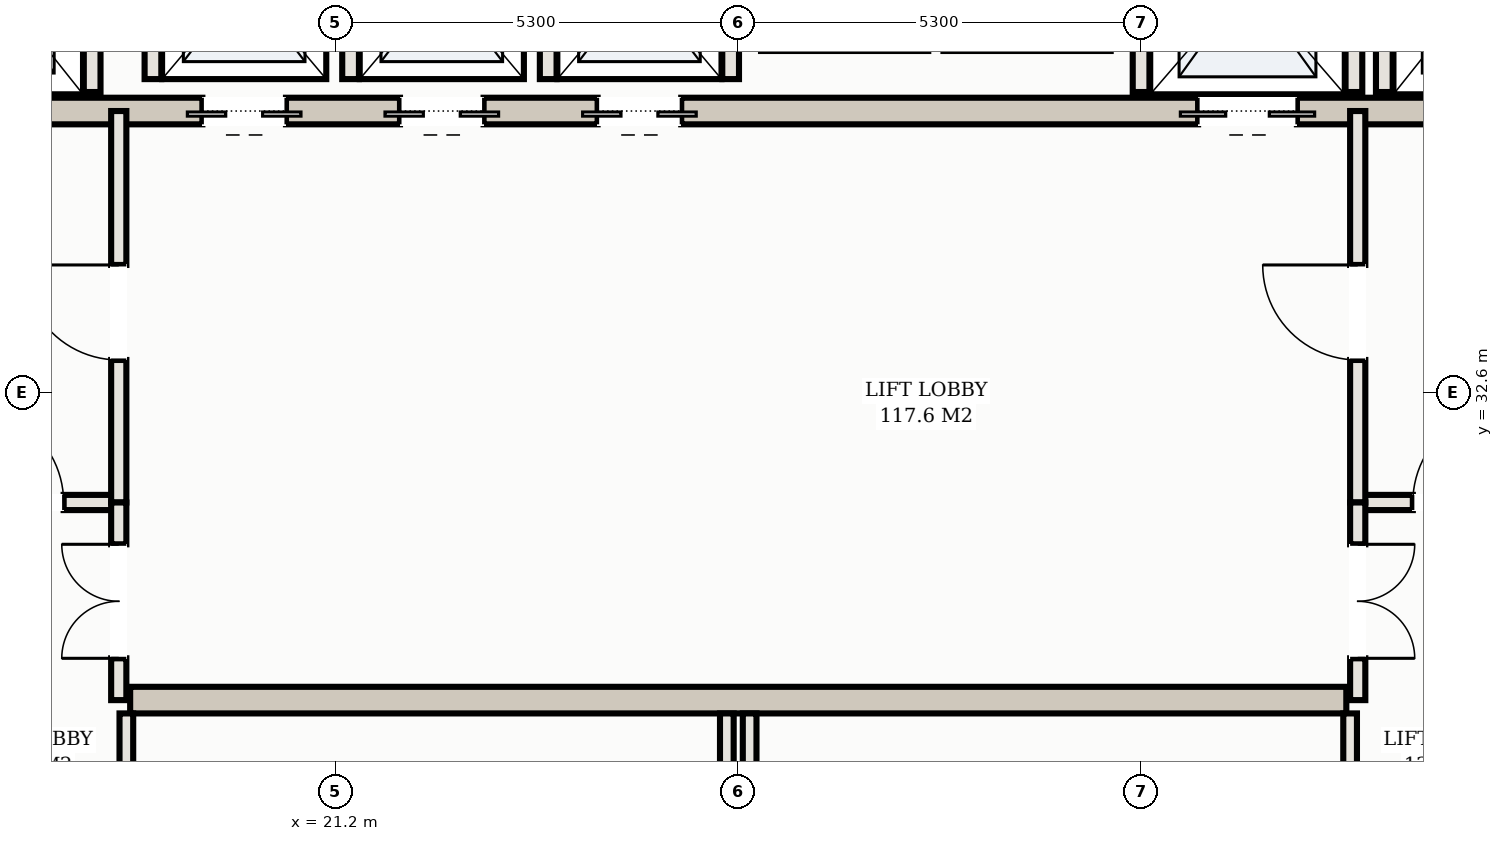
"""IFC4 building model, lengths in metres.
Left out: names, types, materials, properties, quantities, classifications, styles, units other than length and angle.
Written with IfcOpenShell. Run it as: python <this file> out.ifc"""

import sys

from ifc_helpers import new_model, si_unit, direction, frame, frame_2d, origin, place, context, subcontext, project, spatial, rectangle, extrude, element, fill, save


model = new_model("IFC4")
c1 = context("Model", 3, precision=1e-05, world=origin(), true_north=direction((0.0, 1.0)))
c2 = subcontext(c1, "Body", "Model", "MODEL_VIEW")
j1 = project(units=[si_unit("LENGTHUNIT", "METRE"), si_unit("PLANEANGLEUNIT", "RADIAN")], contexts=[c1])
p1 = place(None, origin())
s1 = spatial("IfcSite", under=j1, at=p1, CompositionType="ELEMENT")
p2 = place(p1, origin())
s2 = spatial("IfcBuilding", under=s1, at=p2, CompositionType="ELEMENT")
p3 = place(p2, frame((0.0, 0.0, 200.0)))
s3 = spatial("IfcBuildingStorey", under=s2, at=p3, CompositionType="ELEMENT", Elevation=200.0)
p4 = place(p3, frame((15.5, 36.3, 0.0), z_axis=(0.0, 0.0, 1.0), x_axis=(1.0, 0.0, 0.0)))
e1 = element("IfcWall", 1, at=p4, inside=s3, PredefinedType="SHEAR", context=c2, shape_type="SweptSolid", body=[
    extrude(rectangle(XDim=22.0, YDim=0.35, at=frame_2d((11.0, 0.0))), origin(), (0.0, 0.0, 1.0), 3.11),
])
p5 = place(p4, frame((0.65, 0.0, 0.0)))
e2 = element("IfcOpeningElement", 2, at=p5, cuts=e1, PredefinedType="OPENING", context=c2, shape_type="SweptSolid", body=[
    extrude(rectangle(XDim=1.1, YDim=2.15, at=frame_2d((0.55, 1.075))), frame((0.0, 0.185, 0.0), z_axis=(0.0, -1.0, 0.0), x_axis=(1.0, 0.0, 0.0)), (0.0, 0.0, 1.0), 0.37),
])
p6 = place(p4, frame((20.25, 0.0, 0.0)))
e3 = element("IfcOpeningElement", 3, at=p6, cuts=e1, PredefinedType="OPENING", context=c2, shape_type="SweptSolid", body=[
    extrude(rectangle(XDim=1.1, YDim=2.15, at=frame_2d((0.55, 1.075))), frame((0.0, 0.185, 0.0), z_axis=(0.0, -1.0, 0.0), x_axis=(1.0, 0.0, 0.0)), (0.0, 0.0, 1.0), 0.37),
])
p7 = place(p4, frame((17.05, 0.0, 0.0)))
e4 = element("IfcOpeningElement", 4, at=p7, cuts=e1, PredefinedType="OPENING", context=c2, shape_type="SweptSolid", body=[
    extrude(rectangle(XDim=1.3, YDim=2.2, at=frame_2d((0.65, 1.1))), frame((0.0, 0.185, 0.0), z_axis=(0.0, -1.0, 0.0), x_axis=(1.0, 0.0, 0.0)), (0.0, 0.0, 1.0), 0.37),
])
p8 = place(p4, frame((3.95, 0.0, 0.0)))
e5 = element("IfcOpeningElement", 5, at=p8, cuts=e1, PredefinedType="OPENING", context=c2, shape_type="SweptSolid", body=[
    extrude(rectangle(XDim=1.1, YDim=2.15, at=frame_2d((0.55, 1.075))), frame((0.0, 0.185, 0.0), z_axis=(0.0, -1.0, 0.0), x_axis=(1.0, 0.0, 0.0)), (0.0, 0.0, 1.0), 0.37),
])
p9 = place(p4, frame((6.55, 0.0, 0.0)))
e6 = element("IfcOpeningElement", 6, at=p9, cuts=e1, PredefinedType="OPENING", context=c2, shape_type="SweptSolid", body=[
    extrude(rectangle(XDim=1.1, YDim=2.15, at=frame_2d((0.55, 1.075))), frame((0.0, 0.185, 0.0), z_axis=(0.0, -1.0, 0.0), x_axis=(1.0, 0.0, 0.0)), (0.0, 0.0, 1.0), 0.37),
])
p10 = place(p4, frame((9.15, 0.0, 0.0)))
e7 = element("IfcOpeningElement", 7, at=p10, cuts=e1, PredefinedType="OPENING", context=c2, shape_type="SweptSolid", body=[
    extrude(rectangle(XDim=1.1, YDim=2.15, at=frame_2d((0.55, 1.075))), frame((0.0, 0.185, 0.0), z_axis=(0.0, -1.0, 0.0), x_axis=(1.0, 0.0, 0.0)), (0.0, 0.0, 1.0), 0.37),
])
p11 = place(p3, frame((18.5, 28.55, 0.0), z_axis=(0.0, 0.0, 1.0), x_axis=(1.0, 0.0, 0.0)))
e8 = element("IfcWall", 8, at=p11, inside=s3, PredefinedType="SHEAR", context=c2, shape_type="SweptSolid", body=[
    extrude(rectangle(XDim=16.0, YDim=0.35, at=frame_2d((8.0, 0.0))), origin(), (0.0, 0.0, 1.0), 3.11),
])
for number, where, z_axis, x_axis in (
    (9, (18.0, 36.55, 0.0), (0.0, 0.0, 1.0), (0.0, 1.0, 0.0)),
    (10, (35.0, 36.55, 0.0), (0.0, 0.0, 1.0), (0.0, 1.0, 0.0)),
    (11, (31.8, 36.55, 0.0), (0.0, 0.0, 1.0), (0.0, 1.0, 0.0)),
    (12, (34.6, 36.55, 0.0), (0.0, 0.0, 1.0), (0.0, 1.0, 0.0)),
):
    element("IfcWall", number, at=place(p3, frame(where, z_axis=z_axis, x_axis=x_axis)), inside=s3, PredefinedType="SOLIDWALL", context=c2, shape_type="SweptSolid", body=[
        extrude(rectangle(XDim=2.93, YDim=0.22, at=frame_2d((1.465, 0.0))), origin(), (0.0, 0.0, 1.0), 3.11),
    ])
for number, where, z_axis, x_axis in (
    (13, (18.8, 36.72, 0.0), (0.0, 0.0, 1.0), (0.0, 1.0, 0.0)),
    (14, (21.4, 36.72, 0.0), (0.0, 0.0, 1.0), (0.0, 1.0, 0.0)),
    (15, (24.0, 36.72, 0.0), (0.0, 0.0, 1.0), (0.0, 1.0, 0.0)),
    (16, (26.4, 36.72, 0.0), (0.0, 0.0, 1.0), (0.0, 1.0, 0.0)),
):
    element("IfcWall", number, at=place(p3, frame(where, z_axis=z_axis, x_axis=x_axis)), inside=s3, PredefinedType="SOLIDWALL", context=c2, shape_type="SweptSolid", body=[
        extrude(rectangle(XDim=2.56, YDim=0.22, at=frame_2d((1.28, 0.0))), origin(), (0.0, 0.0, 1.0), 3.11),
    ])
p12 = place(p3, frame((15.1, 31.15, 0.0), z_axis=(0.0, 0.0, 1.0), x_axis=(1.0, 0.0, 0.0)))
e17 = element("IfcWall", 17, at=p12, inside=s3, PredefinedType="PARTITIONING", context=c2, shape_type="SweptSolid", body=[
    extrude(rectangle(XDim=3.25, YDim=0.2, at=frame_2d((1.625, 0.0))), origin(), (0.0, 0.0, 1.0), 2.43),
])
p13 = place(p12, frame((1.275, 0.0, 0.0)))
e18 = element("IfcOpeningElement", 18, at=p13, cuts=e17, PredefinedType="OPENING", context=c2, shape_type="SweptSolid", body=[
    extrude(rectangle(XDim=1.25, YDim=2.2, at=frame_2d((0.625, 1.1))), frame((0.0, 0.11, 0.0), z_axis=(0.0, -1.0, 0.0), x_axis=(1.0, 0.0, 0.0)), (0.0, 0.0, 1.0), 0.22),
])
p14 = place(p3, frame((18.35, 31.15, 0.0), z_axis=(0.0, 0.0, 1.0), x_axis=(0.0, 1.0, 0.0)))
e19 = element("IfcWall", 19, at=p14, inside=s3, PredefinedType="PARTITIONING", context=c2, shape_type="SweptSolid", body=[
    extrude(rectangle(XDim=5.15, YDim=0.2, at=frame_2d((2.575, 0.0))), origin(), (0.0, 0.0, 1.0), 2.43),
])
p15 = place(p14, frame((1.875, 0.0, 0.0)))
e20 = element("IfcOpeningElement", 20, at=p15, cuts=e19, PredefinedType="OPENING", context=c2, shape_type="SweptSolid", body=[
    extrude(rectangle(XDim=1.25, YDim=2.2, at=frame_2d((0.625, 1.1))), frame((0.0, 0.11, 0.0), z_axis=(0.0, -1.0, 0.0), x_axis=(1.0, 0.0, 0.0)), (0.0, 0.0, 1.0), 0.22),
])
p16 = place(p3, frame((34.65, 31.15, 0.0), z_axis=(0.0, 0.0, 1.0), x_axis=(1.0, 0.0, 0.0)))
e21 = element("IfcWall", 21, at=p16, inside=s3, PredefinedType="PARTITIONING", context=c2, shape_type="SweptSolid", body=[
    extrude(rectangle(XDim=3.25, YDim=0.2, at=frame_2d((1.625, 0.0))), origin(), (0.0, 0.0, 1.0), 2.43),
])
p17 = place(p16, frame((0.725, 0.0, 0.0)))
e22 = element("IfcOpeningElement", 22, at=p17, cuts=e21, PredefinedType="OPENING", context=c2, shape_type="SweptSolid", body=[
    extrude(rectangle(XDim=1.25, YDim=2.2, at=frame_2d((0.625, 1.1))), frame((0.0, 0.11, 0.0), z_axis=(0.0, -1.0, 0.0), x_axis=(1.0, 0.0, 0.0)), (0.0, 0.0, 1.0), 0.22),
])
p18 = place(p3, frame((34.65, 31.15, 0.0), z_axis=(0.0, 0.0, 1.0), x_axis=(0.0, 1.0, 0.0)))
e23 = element("IfcWall", 23, at=p18, inside=s3, PredefinedType="PARTITIONING", context=c2, shape_type="SweptSolid", body=[
    extrude(rectangle(XDim=5.15, YDim=0.2, at=frame_2d((2.575, 0.0))), origin(), (0.0, 0.0, 1.0), 2.43),
])
p19 = place(p18, frame((1.875, 0.0, 0.0)))
e24 = element("IfcOpeningElement", 24, at=p19, cuts=e23, PredefinedType="OPENING", context=c2, shape_type="SweptSolid", body=[
    extrude(rectangle(XDim=1.25, YDim=2.2, at=frame_2d((0.625, 1.1))), frame((0.0, 0.11, 0.0), z_axis=(0.0, -1.0, 0.0), x_axis=(1.0, 0.0, 0.0)), (0.0, 0.0, 1.0), 0.22),
])
p20 = place(p3, frame((18.35, 28.55, 0.0), z_axis=(0.0, 0.0, 1.0), x_axis=(0.0, 1.0, 0.0)))
e25 = element("IfcWall", 25, at=p20, inside=s3, PredefinedType="PARTITIONING", context=c2, shape_type="SweptSolid", body=[
    extrude(rectangle(XDim=2.6, YDim=0.2, at=frame_2d((1.3, 0.0))), origin(), (0.0, 0.0, 1.0), 2.43),
])
p21 = place(p20, frame((0.55, 0.0, 0.0)))
e26 = element("IfcOpeningElement", 26, at=p21, cuts=e25, PredefinedType="OPENING", context=c2, shape_type="SweptSolid", body=[
    extrude(rectangle(XDim=1.5, YDim=2.25, at=frame_2d((0.75, 1.125))), frame((0.0, 0.11, 0.0), z_axis=(0.0, -1.0, 0.0), x_axis=(1.0, 0.0, 0.0)), (0.0, 0.0, 1.0), 0.22),
])
p22 = place(p3, frame((34.65, 28.55, 0.0), z_axis=(0.0, 0.0, 1.0), x_axis=(0.0, 1.0, 0.0)))
e27 = element("IfcWall", 27, at=p22, inside=s3, PredefinedType="PARTITIONING", context=c2, shape_type="SweptSolid", body=[
    extrude(rectangle(XDim=2.6, YDim=0.2, at=frame_2d((1.3, 0.0))), origin(), (0.0, 0.0, 1.0), 2.43),
])
p23 = place(p22, frame((0.55, 0.0, 0.0)))
e28 = element("IfcOpeningElement", 28, at=p23, cuts=e27, PredefinedType="OPENING", context=c2, shape_type="SweptSolid", body=[
    extrude(rectangle(XDim=1.5, YDim=2.25, at=frame_2d((0.75, 1.125))), frame((0.0, 0.11, 0.0), z_axis=(0.0, -1.0, 0.0), x_axis=(1.0, 0.0, 0.0)), (0.0, 0.0, 1.0), 0.22),
])
for number, where, z_axis, x_axis in (
    (29, (18.45, 25.62, 0.0), (0.0, 0.0, 1.0), (0.0, 1.0, 0.0)),
    (30, (26.35, 25.62, 0.0), (0.0, 0.0, 1.0), (0.0, 1.0, 0.0)),
    (31, (26.65, 25.62, 0.0), (0.0, 0.0, 1.0), (0.0, 1.0, 0.0)),
    (32, (34.55, 25.62, 0.0), (0.0, 0.0, 1.0), (0.0, 1.0, 0.0)),
):
    element("IfcWall", number, at=place(p3, frame(where, z_axis=z_axis, x_axis=x_axis)), inside=s3, PredefinedType="PARTITIONING", context=c2, shape_type="SweptSolid", body=[
        extrude(rectangle(XDim=2.755, YDim=0.18, at=frame_2d((1.377, 0.0))), origin(), (0.0, 0.0, 1.0), 2.43),
    ])
p24 = place(p7, frame((1.3, 0.0, 0.0), z_axis=(0.0, 0.0, 1.0), x_axis=(-1.0, 0.0, 0.0)))
e33 = element("IfcDoor", 33, at=p24, inside=s3, OperationType="DOUBLE_DOOR_SLIDING", PredefinedType="DOOR", context=c2, shape_type="SweptSolid", body=[
    extrude(rectangle(XDim=1.3, YDim=2.2, at=frame_2d((0.65, 1.1))), frame((0.0, 0.025, 0.0), z_axis=(0.0, -1.0, 0.0), x_axis=(1.0, 0.0, 0.0)), (0.0, 0.0, 1.0), 0.05),
])
fill(e4, e33)
p25 = place(p8, frame((1.1, 0.0, 0.0), z_axis=(0.0, 0.0, 1.0), x_axis=(-1.0, 0.0, 0.0)))
e34 = element("IfcDoor", 34, at=p25, inside=s3, OperationType="DOUBLE_DOOR_SLIDING", PredefinedType="DOOR", context=c2, shape_type="SweptSolid", body=[
    extrude(rectangle(XDim=1.1, YDim=2.15, at=frame_2d((0.55, 1.075))), frame((0.0, 0.025, 0.0), z_axis=(0.0, -1.0, 0.0), x_axis=(1.0, 0.0, 0.0)), (0.0, 0.0, 1.0), 0.05),
])
fill(e5, e34)
p26 = place(p9, frame((1.1, 0.0, 0.0), z_axis=(0.0, 0.0, 1.0), x_axis=(-1.0, 0.0, 0.0)))
e35 = element("IfcDoor", 35, at=p26, inside=s3, OperationType="DOUBLE_DOOR_SLIDING", PredefinedType="DOOR", context=c2, shape_type="SweptSolid", body=[
    extrude(rectangle(XDim=1.1, YDim=2.15, at=frame_2d((0.55, 1.075))), frame((0.0, 0.025, 0.0), z_axis=(0.0, -1.0, 0.0), x_axis=(1.0, 0.0, 0.0)), (0.0, 0.0, 1.0), 0.05),
])
fill(e6, e35)
p27 = place(p10, frame((1.1, 0.0, 0.0), z_axis=(0.0, 0.0, 1.0), x_axis=(-1.0, 0.0, 0.0)))
e36 = element("IfcDoor", 36, at=p27, inside=s3, OperationType="DOUBLE_DOOR_SLIDING", PredefinedType="DOOR", context=c2, shape_type="SweptSolid", body=[
    extrude(rectangle(XDim=1.1, YDim=2.15, at=frame_2d((0.55, 1.075))), frame((0.0, 0.025, 0.0), z_axis=(0.0, -1.0, 0.0), x_axis=(1.0, 0.0, 0.0)), (0.0, 0.0, 1.0), 0.05),
])
fill(e7, e36)
p28 = place(p13, origin())
e37 = element("IfcDoor", 37, at=p28, inside=s3, OperationType="SINGLE_SWING_LEFT", PredefinedType="DOOR", context=c2, shape_type="SweptSolid", body=[
    extrude(rectangle(XDim=1.25, YDim=2.2, at=frame_2d((0.625, 1.1))), frame((0.0, 0.025, 0.0), z_axis=(0.0, -1.0, 0.0), x_axis=(1.0, 0.0, 0.0)), (0.0, 0.0, 1.0), 0.05),
])
fill(e18, e37)
p29 = place(p15, origin())
e38 = element("IfcDoor", 38, at=p29, inside=s3, OperationType="SINGLE_SWING_RIGHT", PredefinedType="DOOR", context=c2, shape_type="SweptSolid", body=[
    extrude(rectangle(XDim=1.25, YDim=2.2, at=frame_2d((0.625, 1.1))), frame((0.0, 0.025, 0.0), z_axis=(0.0, -1.0, 0.0), x_axis=(1.0, 0.0, 0.0)), (0.0, 0.0, 1.0), 0.05),
])
fill(e20, e38)
p30 = place(p17, origin())
e39 = element("IfcDoor", 39, at=p30, inside=s3, OperationType="SINGLE_SWING_RIGHT", PredefinedType="DOOR", context=c2, shape_type="SweptSolid", body=[
    extrude(rectangle(XDim=1.25, YDim=2.2, at=frame_2d((0.625, 1.1))), frame((0.0, 0.025, 0.0), z_axis=(0.0, -1.0, 0.0), x_axis=(1.0, 0.0, 0.0)), (0.0, 0.0, 1.0), 0.05),
])
fill(e22, e39)
p31 = place(p19, origin())
e40 = element("IfcDoor", 40, at=p31, inside=s3, OperationType="SINGLE_SWING_RIGHT", PredefinedType="DOOR", context=c2, shape_type="SweptSolid", body=[
    extrude(rectangle(XDim=1.25, YDim=2.2, at=frame_2d((0.625, 1.1))), frame((0.0, 0.025, 0.0), z_axis=(0.0, -1.0, 0.0), x_axis=(1.0, 0.0, 0.0)), (0.0, 0.0, 1.0), 0.05),
])
fill(e24, e40)
p32 = place(p21, origin())
e41 = element("IfcDoor", 41, at=p32, inside=s3, OperationType="DOUBLE_DOOR_SINGLE_SWING", PredefinedType="DOOR", context=c2, shape_type="SweptSolid", body=[
    extrude(rectangle(XDim=1.5, YDim=2.25, at=frame_2d((0.75, 1.125))), frame((0.0, 0.025, 0.0), z_axis=(0.0, -1.0, 0.0), x_axis=(1.0, 0.0, 0.0)), (0.0, 0.0, 1.0), 0.05),
])
fill(e26, e41)
p33 = place(p23, frame((1.5, 0.0, 0.0), z_axis=(0.0, 0.0, 1.0), x_axis=(-1.0, 0.0, 0.0)))
e42 = element("IfcDoor", 42, at=p33, inside=s3, OperationType="DOUBLE_DOOR_SINGLE_SWING", PredefinedType="DOOR", context=c2, shape_type="SweptSolid", body=[
    extrude(rectangle(XDim=1.5, YDim=2.25, at=frame_2d((0.75, 1.125))), frame((0.0, 0.025, 0.0), z_axis=(0.0, -1.0, 0.0), x_axis=(1.0, 0.0, 0.0)), (0.0, 0.0, 1.0), 0.05),
])
fill(e28, e42)
save(model, sys.argv[1])
